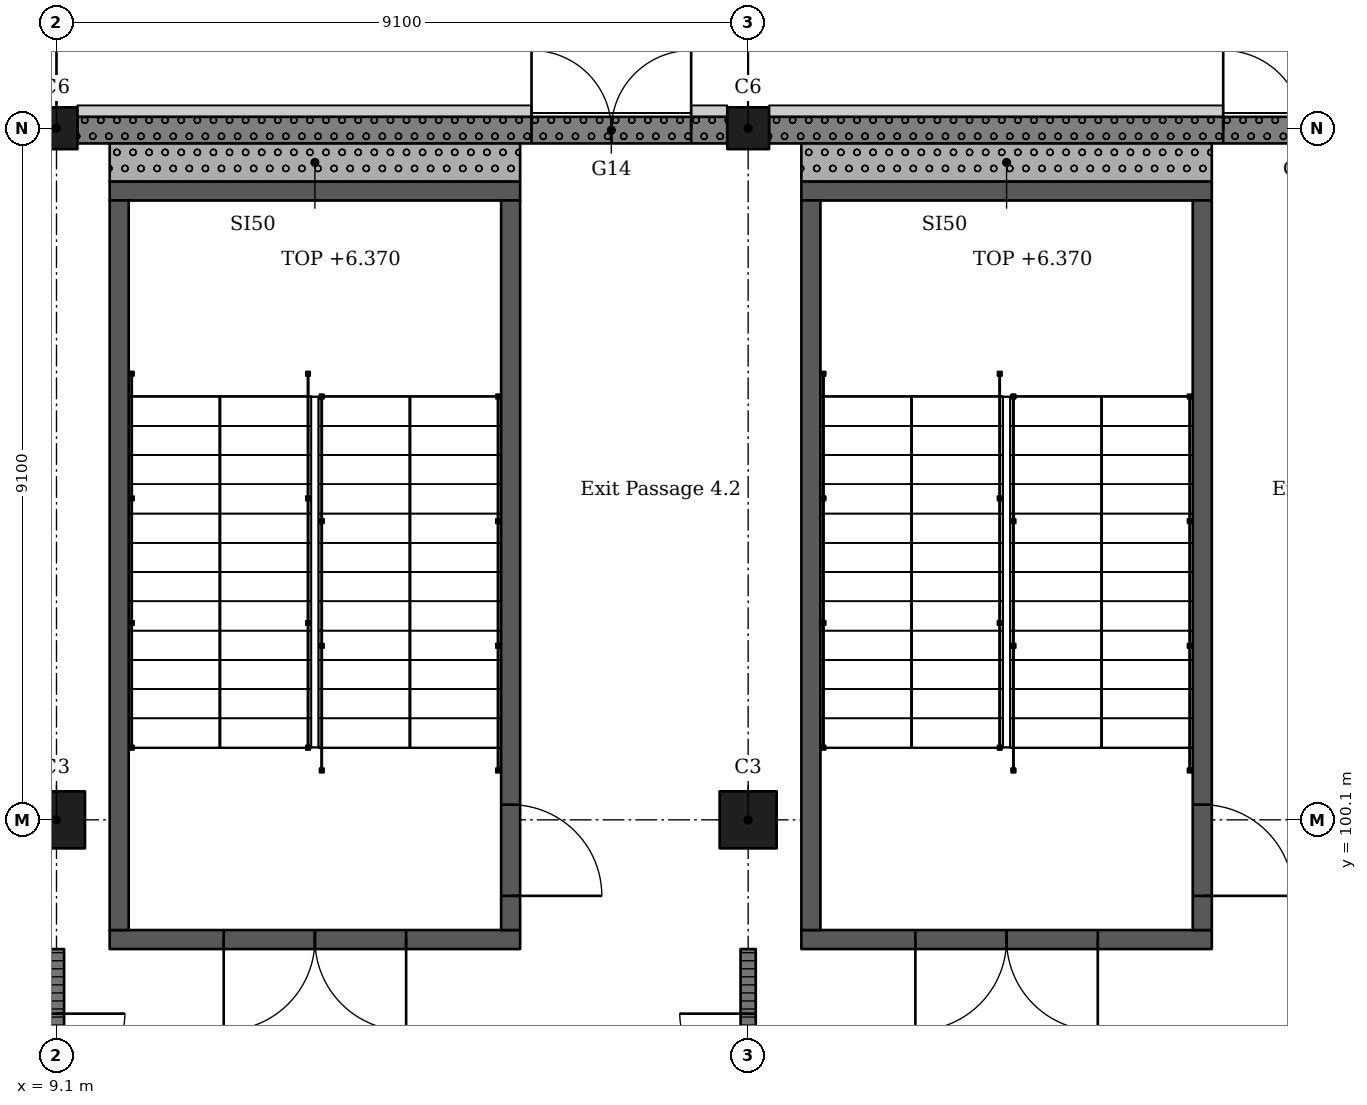
"""IFC4 building model, lengths in metres.
Left out: names, types, materials, properties, quantities, classifications, styles, units other than length and angle.
Written with IfcOpenShell. Run it as: python <this file> out.ifc"""

import sys

from ifc_helpers import new_model, si_unit, direction, frame, frame_2d, origin, origin_2d, place, context, subcontext, project, spatial, rectangle, extrude, element, fill, save


model = new_model("IFC4")
c1 = context("Model", 3, precision=1e-05, world=origin(), true_north=direction((0.0, 1.0)))
c2 = subcontext(c1, "Body", "Model", "MODEL_VIEW")
j1 = project(units=[si_unit("LENGTHUNIT", "METRE"), si_unit("PLANEANGLEUNIT", "RADIAN")], contexts=[c1])
p1 = place(None, origin())
s1 = spatial("IfcSite", under=j1, at=p1, CompositionType="ELEMENT")
p2 = place(p1, origin())
s2 = spatial("IfcBuilding", under=s1, at=p2, CompositionType="ELEMENT")
p3 = place(p2, origin())
s3 = spatial("IfcBuildingStorey", under=s2, at=p3, CompositionType="ELEMENT", Elevation=0.0)
p4 = place(p3, frame((9.1, 100.1, -0.4), z_axis=(0.0, 0.0, 1.0), x_axis=(1.0, 0.0, 0.0)))
e1 = element("IfcColumn", 1, at=p4, inside=s3, PredefinedType="COLUMN", context=c2, shape_type="SweptSolid", body=[
    extrude(rectangle(XDim=0.75, YDim=0.75, at=origin_2d()), origin(), (0.0, 0.0, 1.0), 6.77),
])
p5 = place(p3, frame((9.1, 109.2, -0.4), z_axis=(0.0, 0.0, 1.0), x_axis=(1.0, 0.0, 0.0)))
e2 = element("IfcColumn", 2, at=p5, inside=s3, PredefinedType="COLUMN", context=c2, shape_type="SweptSolid", body=[
    extrude(rectangle(XDim=0.55, YDim=0.55, at=origin_2d()), origin(), (0.0, 0.0, 1.0), 6.77),
])
p6 = place(p3, frame((18.2, 100.1, -0.4), z_axis=(0.0, 0.0, 1.0), x_axis=(1.0, 0.0, 0.0)))
e3 = element("IfcColumn", 3, at=p6, inside=s3, PredefinedType="COLUMN", context=c2, shape_type="SweptSolid", body=[
    extrude(rectangle(XDim=0.75, YDim=0.75, at=origin_2d()), origin(), (0.0, 0.0, 1.0), 6.77),
])
p7 = place(p3, frame((18.2, 109.2, -0.4), z_axis=(0.0, 0.0, 1.0), x_axis=(1.0, 0.0, 0.0)))
e4 = element("IfcColumn", 4, at=p7, inside=s3, PredefinedType="COLUMN", context=c2, shape_type="SweptSolid", body=[
    extrude(rectangle(XDim=0.55, YDim=0.55, at=origin_2d()), origin(), (0.0, 0.0, 1.0), 6.77),
])
p8 = place(p3, frame((15.2, 98.525, -0.4), z_axis=(0.0, 0.0, 1.0), x_axis=(-1.0, 0.0, 0.0)))
e5 = element("IfcWall", 5, at=p8, inside=s3, PredefinedType="SHEAR", context=c2, shape_type="SweptSolid", body=[
    extrude(rectangle(XDim=5.4, YDim=0.25, at=frame_2d((2.7, 0.0))), origin(), (0.0, 0.0, 1.0), 6.77),
])
p9 = place(p8, frame((1.5, 0.0, 0.4)))
e6 = element("IfcOpeningElement", 6, at=p9, cuts=e5, PredefinedType="OPENING", context=c2, shape_type="SweptSolid", body=[
    extrude(rectangle(XDim=2.4, YDim=2.1, at=frame_2d((1.2, 1.05))), frame((0.0, 0.135, 0.0), z_axis=(0.0, -1.0, 0.0), x_axis=(1.0, 0.0, 0.0)), (0.0, 0.0, 1.0), 0.27),
])
p10 = place(p3, frame((15.2, 108.375, -0.4), z_axis=(0.0, 0.0, 1.0), x_axis=(-1.0, 0.0, 0.0)))
e7 = element("IfcWall", 7, at=p10, inside=s3, PredefinedType="SHEAR", context=c2, shape_type="SweptSolid", body=[
    extrude(rectangle(XDim=5.4, YDim=0.25, at=frame_2d((2.7, 0.0))), origin(), (0.0, 0.0, 1.0), 6.77),
])
p11 = place(p3, frame((9.925, 108.25, -0.4), z_axis=(0.0, 0.0, 1.0), x_axis=(0.0, -1.0, 0.0)))
e8 = element("IfcWall", 8, at=p11, inside=s3, PredefinedType="SHEAR", context=c2, shape_type="SweptSolid", body=[
    extrude(rectangle(XDim=9.6, YDim=0.25, at=frame_2d((4.8, 0.0))), origin(), (0.0, 0.0, 1.0), 6.77),
])
p12 = place(p3, frame((15.075, 108.25, -0.4), z_axis=(0.0, 0.0, 1.0), x_axis=(0.0, -1.0, 0.0)))
e9 = element("IfcWall", 9, at=p12, inside=s3, PredefinedType="SHEAR", context=c2, shape_type="SweptSolid", body=[
    extrude(rectangle(XDim=9.6, YDim=0.25, at=frame_2d((4.8, 0.0))), origin(), (0.0, 0.0, 1.0), 6.77),
])
p13 = place(p12, frame((7.95, 0.0, 0.4)))
e10 = element("IfcOpeningElement", 10, at=p13, cuts=e9, PredefinedType="OPENING", context=c2, shape_type="SweptSolid", body=[
    extrude(rectangle(XDim=1.2, YDim=2.1, at=frame_2d((0.6, 1.05))), frame((0.0, 0.135, 0.0), z_axis=(0.0, -1.0, 0.0), x_axis=(1.0, 0.0, 0.0)), (0.0, 0.0, 1.0), 0.27),
])
p14 = place(p3, frame((24.3, 98.525, -0.4), z_axis=(0.0, 0.0, 1.0), x_axis=(-1.0, 0.0, 0.0)))
e11 = element("IfcWall", 11, at=p14, inside=s3, PredefinedType="SHEAR", context=c2, shape_type="SweptSolid", body=[
    extrude(rectangle(XDim=5.4, YDim=0.25, at=frame_2d((2.7, 0.0))), origin(), (0.0, 0.0, 1.0), 6.77),
])
p15 = place(p14, frame((1.5, 0.0, 0.4)))
e12 = element("IfcOpeningElement", 12, at=p15, cuts=e11, PredefinedType="OPENING", context=c2, shape_type="SweptSolid", body=[
    extrude(rectangle(XDim=2.4, YDim=2.1, at=frame_2d((1.2, 1.05))), frame((0.0, 0.135, 0.0), z_axis=(0.0, -1.0, 0.0), x_axis=(1.0, 0.0, 0.0)), (0.0, 0.0, 1.0), 0.27),
])
p16 = place(p3, frame((24.3, 108.375, -0.4), z_axis=(0.0, 0.0, 1.0), x_axis=(-1.0, 0.0, 0.0)))
e13 = element("IfcWall", 13, at=p16, inside=s3, PredefinedType="SHEAR", context=c2, shape_type="SweptSolid", body=[
    extrude(rectangle(XDim=5.4, YDim=0.25, at=frame_2d((2.7, 0.0))), origin(), (0.0, 0.0, 1.0), 6.77),
])
p17 = place(p3, frame((19.025, 108.25, -0.4), z_axis=(0.0, 0.0, 1.0), x_axis=(0.0, -1.0, 0.0)))
e14 = element("IfcWall", 14, at=p17, inside=s3, PredefinedType="SHEAR", context=c2, shape_type="SweptSolid", body=[
    extrude(rectangle(XDim=9.6, YDim=0.25, at=frame_2d((4.8, 0.0))), origin(), (0.0, 0.0, 1.0), 6.77),
])
p18 = place(p3, frame((24.175, 108.25, -0.4), z_axis=(0.0, 0.0, 1.0), x_axis=(0.0, -1.0, 0.0)))
e15 = element("IfcWall", 15, at=p18, inside=s3, PredefinedType="SHEAR", context=c2, shape_type="SweptSolid", body=[
    extrude(rectangle(XDim=9.6, YDim=0.25, at=frame_2d((4.8, 0.0))), origin(), (0.0, 0.0, 1.0), 6.77),
])
p19 = place(p18, frame((7.95, 0.0, 0.4)))
e16 = element("IfcOpeningElement", 16, at=p19, cuts=e15, PredefinedType="OPENING", context=c2, shape_type="SweptSolid", body=[
    extrude(rectangle(XDim=1.2, YDim=2.1, at=frame_2d((0.6, 1.05))), frame((0.0, 0.135, 0.0), z_axis=(0.0, -1.0, 0.0), x_axis=(1.0, 0.0, 0.0)), (0.0, 0.0, 1.0), 0.27),
])
p20 = place(p3, frame((27.025, 109.175, 0.0), z_axis=(0.0, 0.0, 1.0), x_axis=(-1.0, 0.0, 0.0)))
e17 = element("IfcWall", 17, at=p20, inside=s3, PredefinedType="SOLIDWALL", context=c2, shape_type="SweptSolid", body=[
    extrude(rectangle(XDim=8.55, YDim=0.35, at=frame_2d((4.275, 0.0))), origin(), (0.0, 0.0, 1.0), 5.27),
])
p21 = place(p20, frame((0.475, 0.0, 0.0)))
e18 = element("IfcOpeningElement", 18, at=p21, cuts=e17, PredefinedType="OPENING", context=c2, shape_type="SweptSolid", body=[
    extrude(rectangle(XDim=2.1, YDim=2.4, at=frame_2d((1.05, 1.2))), frame((0.0, 0.185, 0.0), z_axis=(0.0, -1.0, 0.0), x_axis=(1.0, 0.0, 0.0)), (0.0, 0.0, 1.0), 0.37),
])
p22 = place(p3, frame((17.925, 109.175, 0.0), z_axis=(0.0, 0.0, 1.0), x_axis=(-1.0, 0.0, 0.0)))
e19 = element("IfcWall", 19, at=p22, inside=s3, PredefinedType="SOLIDWALL", context=c2, shape_type="SweptSolid", body=[
    extrude(rectangle(XDim=8.55, YDim=0.35, at=frame_2d((4.275, 0.0))), origin(), (0.0, 0.0, 1.0), 5.27),
])
p23 = place(p22, frame((0.475, 0.0, 0.0)))
e20 = element("IfcOpeningElement", 20, at=p23, cuts=e19, PredefinedType="OPENING", context=c2, shape_type="SweptSolid", body=[
    extrude(rectangle(XDim=2.1, YDim=2.4, at=frame_2d((1.05, 1.2))), frame((0.0, 0.185, 0.0), z_axis=(0.0, -1.0, 0.0), x_axis=(1.0, 0.0, 0.0)), (0.0, 0.0, 1.0), 0.37),
])
p24 = place(p3, frame((9.8, 108.75, 0.0), z_axis=(0.0, 0.0, 1.0), x_axis=(1.0, 0.0, 0.0)))
e21 = element("IfcWall", 21, at=p24, inside=s3, PredefinedType="SOLIDWALL", context=c2, shape_type="SweptSolid", body=[
    extrude(rectangle(XDim=5.4, YDim=0.5, at=frame_2d((2.7, 0.0))), origin(), (0.0, 0.0, 1.0), 6.37),
])
p25 = place(p3, frame((18.9, 108.75, 0.0), z_axis=(0.0, 0.0, 1.0), x_axis=(1.0, 0.0, 0.0)))
e22 = element("IfcWall", 22, at=p25, inside=s3, PredefinedType="SOLIDWALL", context=c2, shape_type="SweptSolid", body=[
    extrude(rectangle(XDim=5.4, YDim=0.5, at=frame_2d((2.7, 0.0))), origin(), (0.0, 0.0, 1.0), 6.37),
])
p26 = place(p3, frame((9.1, 98.4, 0.0), z_axis=(0.0, 0.0, 1.0), x_axis=(0.0, -1.0, 0.0)))
e23 = element("IfcWall", 23, at=p26, inside=s3, PredefinedType="PARTITIONING", context=c2, shape_type="SweptSolid", body=[
    extrude(rectangle(XDim=6.975, YDim=0.2, at=frame_2d((3.487, 0.0))), origin(), (0.0, 0.0, 1.0), 5.32),
])
p27 = place(p26, frame((0.85, 0.0, 0.0)))
e24 = element("IfcOpeningElement", 24, at=p27, cuts=e23, PredefinedType="OPENING", context=c2, shape_type="SweptSolid", body=[
    extrude(rectangle(XDim=1.8, YDim=2.4, at=frame_2d((0.9, 1.2))), frame((0.0, 0.11, 0.0), z_axis=(0.0, -1.0, 0.0), x_axis=(1.0, 0.0, 0.0)), (0.0, 0.0, 1.0), 0.22),
])
p28 = place(p26, frame((4.35, 0.0, 0.0)))
e25 = element("IfcOpeningElement", 25, at=p28, cuts=e23, PredefinedType="OPENING", context=c2, shape_type="SweptSolid", body=[
    extrude(rectangle(XDim=1.8, YDim=2.4, at=frame_2d((0.9, 1.2))), frame((0.0, 0.11, 0.0), z_axis=(0.0, -1.0, 0.0), x_axis=(1.0, 0.0, 0.0)), (0.0, 0.0, 1.0), 0.22),
])
p29 = place(p3, frame((18.2, 98.4, 0.0), z_axis=(0.0, 0.0, 1.0), x_axis=(0.0, -1.0, 0.0)))
e26 = element("IfcWall", 26, at=p29, inside=s3, PredefinedType="PARTITIONING", context=c2, shape_type="SweptSolid", body=[
    extrude(rectangle(XDim=6.925, YDim=0.2, at=frame_2d((3.462, 0.0))), origin(), (0.0, 0.0, 1.0), 5.32),
])
p30 = place(p29, frame((0.85, 0.0, 0.0)))
e27 = element("IfcOpeningElement", 27, at=p30, cuts=e26, PredefinedType="OPENING", context=c2, shape_type="SweptSolid", body=[
    extrude(rectangle(XDim=1.8, YDim=2.4, at=frame_2d((0.9, 1.2))), frame((0.0, 0.11, 0.0), z_axis=(0.0, -1.0, 0.0), x_axis=(1.0, 0.0, 0.0)), (0.0, 0.0, 1.0), 0.22),
])
p31 = place(p29, frame((4.25, 0.0, 0.0)))
e28 = element("IfcOpeningElement", 28, at=p31, cuts=e26, PredefinedType="OPENING", context=c2, shape_type="SweptSolid", body=[
    extrude(rectangle(XDim=1.8, YDim=2.4, at=frame_2d((0.9, 1.2))), frame((0.0, 0.11, 0.0), z_axis=(0.0, -1.0, 0.0), x_axis=(1.0, 0.0, 0.0)), (0.0, 0.0, 1.0), 0.22),
])
p32 = place(p21, frame((2.1, 0.0, 0.0), z_axis=(0.0, 0.0, 1.0), x_axis=(-1.0, 0.0, 0.0)))
e29 = element("IfcDoor", 29, at=p32, inside=s3, OperationType="DOUBLE_DOOR_SINGLE_SWING", PredefinedType="DOOR", context=c2, shape_type="SweptSolid", body=[
    extrude(rectangle(XDim=2.1, YDim=2.4, at=frame_2d((1.05, 1.2))), frame((0.0, 0.025, 0.0), z_axis=(0.0, -1.0, 0.0), x_axis=(1.0, 0.0, 0.0)), (0.0, 0.0, 1.0), 0.05),
])
fill(e18, e29)
p33 = place(p23, frame((2.1, 0.0, 0.0), z_axis=(0.0, 0.0, 1.0), x_axis=(-1.0, 0.0, 0.0)))
e30 = element("IfcDoor", 30, at=p33, inside=s3, OperationType="DOUBLE_DOOR_SINGLE_SWING", PredefinedType="DOOR", context=c2, shape_type="SweptSolid", body=[
    extrude(rectangle(XDim=2.1, YDim=2.4, at=frame_2d((1.05, 1.2))), frame((0.0, 0.025, 0.0), z_axis=(0.0, -1.0, 0.0), x_axis=(1.0, 0.0, 0.0)), (0.0, 0.0, 1.0), 0.05),
])
fill(e20, e30)
p34 = place(p27, origin())
e31 = element("IfcDoor", 31, at=p34, inside=s3, OperationType="DOUBLE_DOOR_SINGLE_SWING", PredefinedType="DOOR", context=c2, shape_type="SweptSolid", body=[
    extrude(rectangle(XDim=1.8, YDim=2.4, at=frame_2d((0.9, 1.2))), frame((0.0, 0.025, 0.0), z_axis=(0.0, -1.0, 0.0), x_axis=(1.0, 0.0, 0.0)), (0.0, 0.0, 1.0), 0.05),
])
fill(e24, e31)
p35 = place(p30, origin())
e32 = element("IfcDoor", 32, at=p35, inside=s3, OperationType="DOUBLE_DOOR_SINGLE_SWING", PredefinedType="DOOR", context=c2, shape_type="SweptSolid", body=[
    extrude(rectangle(XDim=1.8, YDim=2.4, at=frame_2d((0.9, 1.2))), frame((0.0, 0.025, 0.0), z_axis=(0.0, -1.0, 0.0), x_axis=(1.0, 0.0, 0.0)), (0.0, 0.0, 1.0), 0.05),
])
fill(e27, e32)
p36 = place(p9, origin())
e33 = element("IfcDoor", 33, at=p36, inside=s3, OperationType="DOUBLE_DOOR_SINGLE_SWING", PredefinedType="DOOR", context=c2, shape_type="SweptSolid", body=[
    extrude(rectangle(XDim=2.4, YDim=2.1, at=frame_2d((1.2, 1.05))), frame((0.0, 0.025, 0.0), z_axis=(0.0, -1.0, 0.0), x_axis=(1.0, 0.0, 0.0)), (0.0, 0.0, 1.0), 0.05),
])
fill(e6, e33)
p37 = place(p15, origin())
e34 = element("IfcDoor", 34, at=p37, inside=s3, OperationType="DOUBLE_DOOR_SINGLE_SWING", PredefinedType="DOOR", context=c2, shape_type="SweptSolid", body=[
    extrude(rectangle(XDim=2.4, YDim=2.1, at=frame_2d((1.2, 1.05))), frame((0.0, 0.025, 0.0), z_axis=(0.0, -1.0, 0.0), x_axis=(1.0, 0.0, 0.0)), (0.0, 0.0, 1.0), 0.05),
])
fill(e12, e34)
p38 = place(p13, origin())
e35 = element("IfcDoor", 35, at=p38, inside=s3, OperationType="SINGLE_SWING_LEFT", PredefinedType="DOOR", context=c2, shape_type="SweptSolid", body=[
    extrude(rectangle(XDim=1.2, YDim=2.1, at=frame_2d((0.6, 1.05))), frame((0.0, 0.025, 0.0), z_axis=(0.0, -1.0, 0.0), x_axis=(1.0, 0.0, 0.0)), (0.0, 0.0, 1.0), 0.05),
])
fill(e10, e35)
p39 = place(p19, origin())
e36 = element("IfcDoor", 36, at=p39, inside=s3, OperationType="SINGLE_SWING_LEFT", PredefinedType="DOOR", context=c2, shape_type="SweptSolid", body=[
    extrude(rectangle(XDim=1.2, YDim=2.1, at=frame_2d((0.6, 1.05))), frame((0.0, 0.025, 0.0), z_axis=(0.0, -1.0, 0.0), x_axis=(1.0, 0.0, 0.0)), (0.0, 0.0, 1.0), 0.05),
])
fill(e16, e36)
save(model, sys.argv[1])
